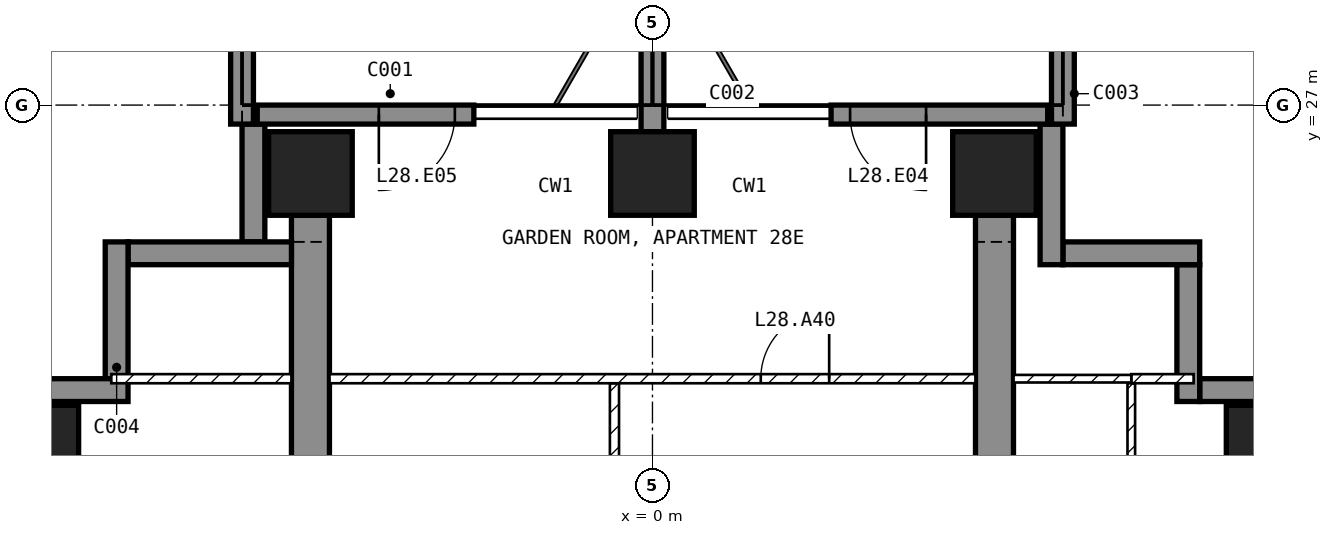
"""IFC4 building model, lengths in metres.
Left out: names, types, materials, properties, quantities, classifications, styles, units other than length and angle.
Written with IfcOpenShell. Run it as: python <this file> out.ifc"""

import sys

from ifc_helpers import new_model, si_unit, direction, frame, frame_2d, origin, origin_2d, place, context, subcontext, project, spatial, polyline, rectangle, outline, extrude, element, fill, save


model = new_model("IFC4")
c1 = context("Model", 3, precision=1e-05, world=origin(), true_north=direction((0.0, 1.0)))
c2 = subcontext(c1, "Body", "Model", "MODEL_VIEW")
j1 = project(units=[si_unit("LENGTHUNIT", "METRE"), si_unit("PLANEANGLEUNIT", "RADIAN")], contexts=[c1])
p1 = place(None, origin())
s1 = spatial("IfcSite", under=j1, at=p1, CompositionType="ELEMENT")
p2 = place(p1, origin())
s2 = spatial("IfcBuilding", under=s1, at=p2, CompositionType="ELEMENT")
p3 = place(p2, frame((0.0, 0.0, 119.9)))
s3 = spatial("IfcBuildingStorey", under=s2, at=p3, CompositionType="ELEMENT", Elevation=119.9)
for number, where, z_axis, x_axis in (
    (1, (-8.1, 22.5, -0.25), (0.0, 0.0, 1.0), (1.0, 0.0, 0.0)),
    (2, (-4.5, 26.1, -0.25), (0.0, 0.0, 1.0), (1.0, 0.0, 0.0)),
    (3, (0.0, 26.1, -0.25), (0.0, 0.0, 1.0), (1.0, 0.0, 0.0)),
    (4, (4.5, 26.1, -0.25), (0.0, 0.0, 1.0), (1.0, 0.0, 0.0)),
    (5, (8.1, 22.5, -0.25), (0.0, 0.0, 1.0), (1.0, 0.0, 0.0)),
):
    element("IfcColumn", number, at=place(p3, frame(where, z_axis=z_axis, x_axis=x_axis)), inside=s3, PredefinedType="COLUMN", context=c2, shape_type="SweptSolid", body=[
        extrude(rectangle(XDim=1.1, YDim=1.1, at=origin_2d()), origin(), (0.0, 0.0, 1.0), 3.5),
    ])
for number, where, z_axis, x_axis in (
    (6, (-4.75, 9.0, -0.25), (1.0, 0.0, 0.0), (0.0, 1.0, 0.0)),
    (7, (4.25, 9.0, -0.25), (1.0, 0.0, 0.0), (0.0, 1.0, 0.0)),
):
    element("IfcWall", number, at=place(p3, frame(where, z_axis=z_axis, x_axis=x_axis)), inside=s3, PredefinedType="SHEAR", context=c2, shape_type="SweptSolid", body=[
        extrude(outline(polyline([(0.0, 0.0), (2.1, 0.0), (2.1, 2.65), (4.5, 2.65), (4.5, 0.0), (9.9, 0.0), (9.9, 2.65), (12.3, 2.65), (12.3, 0.0), (16.55, 0.0), (16.55, 3.5), (0.0, 3.5), (0.0, 0.0)])), origin(), (0.0, 0.0, 1.0), 0.5),
    ])
p4 = place(p3, frame((5.2, 26.875, 0.0), z_axis=(0.0, 0.0, 1.0), x_axis=(-1.0, 0.0, 0.0)))
e8 = element("IfcWall", 8, at=p4, inside=s3, PredefinedType="SOLIDWALL", context=c2, shape_type="SweptSolid", body=[
    extrude(rectangle(XDim=2.85, YDim=0.25, at=frame_2d((1.425, 0.0))), origin(), (0.0, 0.0, 1.0), 3.25),
])
p5 = place(p4, frame((1.6, 0.0, 0.0)))
e9 = element("IfcOpeningElement", 9, at=p5, cuts=e8, PredefinedType="OPENING", context=c2, shape_type="SweptSolid", body=[
    extrude(rectangle(XDim=1.0, YDim=2.4, at=frame_2d((0.5, 1.2))), frame((0.0, 0.135, 0.0), z_axis=(0.0, -1.0, 0.0), x_axis=(1.0, 0.0, 0.0)), (0.0, 0.0, 1.0), 0.27),
])
p6 = place(p3, frame((-2.35, 26.875, 0.0), z_axis=(0.0, 0.0, 1.0), x_axis=(-1.0, 0.0, 0.0)))
e10 = element("IfcWall", 10, at=p6, inside=s3, PredefinedType="SOLIDWALL", context=c2, shape_type="SweptSolid", body=[
    extrude(rectangle(XDim=2.85, YDim=0.25, at=frame_2d((1.425, 0.0))), origin(), (0.0, 0.0, 1.0), 3.25),
])
p7 = place(p6, frame((0.25, 0.0, 0.0)))
e11 = element("IfcOpeningElement", 11, at=p7, cuts=e10, PredefinedType="OPENING", context=c2, shape_type="SweptSolid", body=[
    extrude(rectangle(XDim=1.0, YDim=2.4, at=frame_2d((0.5, 1.2))), frame((0.0, 0.135, 0.0), z_axis=(0.0, -1.0, 0.0), x_axis=(1.0, 0.0, 0.0)), (0.0, 0.0, 1.0), 0.27),
])
p8 = place(p3, frame((8.75, 23.25, 0.0), z_axis=(0.0, 0.0, 1.0), x_axis=(-1.0, 0.0, 0.0)))
e12 = element("IfcWall", 12, at=p8, inside=s3, PredefinedType="SOLIDWALL", context=c2, shape_type="SweptSolid", body=[
    extrude(rectangle(XDim=1.55, YDim=0.3, at=frame_2d((0.775, 0.0))), origin(), (0.0, 0.0, 1.0), 3.25),
])
p9 = place(p3, frame((7.05, 23.1, 0.0), z_axis=(0.0, 0.0, 1.0), x_axis=(0.0, 1.0, 0.0)))
e13 = element("IfcWall", 13, at=p9, inside=s3, PredefinedType="SOLIDWALL", context=c2, shape_type="SweptSolid", body=[
    extrude(rectangle(XDim=1.8, YDim=0.3, at=frame_2d((0.9, 0.0))), origin(), (0.0, 0.0, 1.0), 3.25),
])
p10 = place(p3, frame((7.2, 25.05, 0.0), z_axis=(0.0, 0.0, 1.0), x_axis=(-1.0, 0.0, 0.0)))
e14 = element("IfcWall", 14, at=p10, inside=s3, PredefinedType="SOLIDWALL", context=c2, shape_type="SweptSolid", body=[
    extrude(rectangle(XDim=1.8, YDim=0.3, at=frame_2d((0.9, 0.0))), origin(), (0.0, 0.0, 1.0), 3.25),
])
p11 = place(p3, frame((5.25, 24.9, 0.0), z_axis=(0.0, 0.0, 1.0), x_axis=(0.0, 1.0, 0.0)))
e15 = element("IfcWall", 15, at=p11, inside=s3, PredefinedType="SOLIDWALL", context=c2, shape_type="SweptSolid", body=[
    extrude(rectangle(XDim=1.85, YDim=0.3, at=frame_2d((0.925, 0.0))), origin(), (0.0, 0.0, 1.0), 3.25),
])
p12 = place(p3, frame((-5.25, 26.75, 0.0), z_axis=(0.0, 0.0, 1.0), x_axis=(0.0, -1.0, 0.0)))
e16 = element("IfcWall", 16, at=p12, inside=s3, PredefinedType="SOLIDWALL", context=c2, shape_type="SweptSolid", body=[
    extrude(rectangle(XDim=1.55, YDim=0.3, at=frame_2d((0.775, 0.0))), origin(), (0.0, 0.0, 1.0), 3.25),
])
p13 = place(p3, frame((-4.75, 25.05, 0.0), z_axis=(0.0, 0.0, 1.0), x_axis=(-1.0, 0.0, 0.0)))
e17 = element("IfcWall", 17, at=p13, inside=s3, PredefinedType="SOLIDWALL", context=c2, shape_type="SweptSolid", body=[
    extrude(rectangle(XDim=2.15, YDim=0.3, at=frame_2d((1.075, 0.0))), origin(), (0.0, 0.0, 1.0), 3.25),
])
p14 = place(p3, frame((-7.05, 25.2, 0.0), z_axis=(0.0, 0.0, 1.0), x_axis=(0.0, -1.0, 0.0)))
e18 = element("IfcWall", 18, at=p14, inside=s3, PredefinedType="SOLIDWALL", context=c2, shape_type="SweptSolid", body=[
    extrude(rectangle(XDim=1.8, YDim=0.3, at=frame_2d((0.9, 0.0))), origin(), (0.0, 0.0, 1.0), 3.25),
])
p15 = place(p3, frame((-6.9, 23.25, 0.0), z_axis=(0.0, 0.0, 1.0), x_axis=(-1.0, 0.0, 0.0)))
e19 = element("IfcWall", 19, at=p15, inside=s3, PredefinedType="SOLIDWALL", context=c2, shape_type="SweptSolid", body=[
    extrude(rectangle(XDim=1.85, YDim=0.3, at=frame_2d((0.925, 0.0))), origin(), (0.0, 0.0, 1.0), 3.25),
])
p16 = place(p3, frame((-5.4, 26.75, 0.0), z_axis=(0.0, 0.0, 1.0), x_axis=(0.0, 1.0, 0.0)))
e20 = element("IfcWall", 20, at=p16, inside=s3, PredefinedType="SOLIDWALL", context=c2, shape_type="SweptSolid", body=[
    extrude(rectangle(XDim=2.95, YDim=0.3, at=frame_2d((1.475, 0.0))), origin(), (0.0, 0.0, 1.0), 3.25),
])
p17 = place(p3, frame((0.0, 26.65, 0.0), z_axis=(0.0, 0.0, 1.0), x_axis=(0.0, 1.0, 0.0)))
e21 = element("IfcWall", 21, at=p17, inside=s3, PredefinedType="SOLIDWALL", context=c2, shape_type="SweptSolid", body=[
    extrude(rectangle(XDim=3.05, YDim=0.3, at=frame_2d((1.525, 0.0))), origin(), (0.0, 0.0, 1.0), 3.25),
])
p18 = place(p3, frame((5.4, 26.75, 0.0), z_axis=(0.0, 0.0, 1.0), x_axis=(0.0, 1.0, 0.0)))
e22 = element("IfcWall", 22, at=p18, inside=s3, PredefinedType="SOLIDWALL", context=c2, shape_type="SweptSolid", body=[
    extrude(rectangle(XDim=2.95, YDim=0.3, at=frame_2d((1.475, 0.0))), origin(), (0.0, 0.0, 1.0), 3.25),
])
p19 = place(p3, frame((-0.5, 18.96, 0.0), z_axis=(0.0, 0.0, 1.0), x_axis=(0.0, 1.0, 0.0)))
e23 = element("IfcWall", 23, at=p19, inside=s3, PredefinedType="PARTITIONING", context=c2, shape_type="SweptSolid", body=[
    extrude(rectangle(XDim=4.38, YDim=0.12, at=frame_2d((2.19, 0.0))), origin(), (0.0, 0.0, 1.0), 3.25),
])
p20 = place(p19, frame((1.74, 0.0, 0.0)))
e24 = element("IfcOpeningElement", 24, at=p20, cuts=e23, PredefinedType="OPENING", context=c2, shape_type="SweptSolid", body=[
    extrude(rectangle(XDim=0.9, YDim=2.1, at=frame_2d((0.45, 1.05))), frame((0.0, 0.07, 0.0), z_axis=(0.0, -1.0, 0.0), x_axis=(1.0, 0.0, 0.0)), (0.0, 0.0, 1.0), 0.14),
])
p21 = place(p3, frame((-4.25, 23.4, 0.0), z_axis=(0.0, 0.0, 1.0), x_axis=(1.0, 0.0, 0.0)))
e25 = element("IfcWall", 25, at=p21, inside=s3, PredefinedType="PARTITIONING", context=c2, shape_type="SweptSolid", body=[
    extrude(rectangle(XDim=8.5, YDim=0.12, at=frame_2d((4.25, 0.0))), origin(), (0.0, 0.0, 1.0), 3.25),
])
p22 = place(p21, frame((5.675, 0.0, 0.0)))
e26 = element("IfcOpeningElement", 26, at=p22, cuts=e25, PredefinedType="OPENING", context=c2, shape_type="SweptSolid", body=[
    extrude(rectangle(XDim=0.9, YDim=2.1, at=frame_2d((0.45, 1.05))), frame((0.0, 0.07, 0.0), z_axis=(0.0, -1.0, 0.0), x_axis=(1.0, 0.0, 0.0)), (0.0, 0.0, 1.0), 0.14),
])
p23 = place(p3, frame((6.3, 20.45, 0.0), z_axis=(0.0, 0.0, 1.0), x_axis=(0.0, 1.0, 0.0)))
e27 = element("IfcWall", 27, at=p23, inside=s3, PredefinedType="PARTITIONING", context=c2, shape_type="SweptSolid", body=[
    extrude(rectangle(XDim=2.89, YDim=0.1, at=frame_2d((1.445, 0.0))), origin(), (0.0, 0.0, 1.0), 3.25),
])
p24 = place(p3, frame((6.3, 23.4, 0.0), z_axis=(0.0, 0.0, 1.0), x_axis=(1.0, 0.0, 0.0)))
e28 = element("IfcWall", 28, at=p24, inside=s3, PredefinedType="PARTITIONING", context=c2, shape_type="SweptSolid", body=[
    extrude(rectangle(XDim=0.82, YDim=0.12, at=frame_2d((0.41, 0.0))), origin(), (0.0, 0.0, 1.0), 3.25),
])
p25 = place(p3, frame((4.75, 23.4, 0.0), z_axis=(0.0, 0.0, 1.0), x_axis=(1.0, 0.0, 0.0)))
e29 = element("IfcWall", 29, at=p25, inside=s3, PredefinedType="PARTITIONING", context=c2, shape_type="SweptSolid", body=[
    extrude(rectangle(XDim=1.55, YDim=0.1, at=frame_2d((0.775, 0.0))), origin(), (0.0, 0.0, 1.0), 3.25),
])
p26 = place(p3, frame((-7.12, 23.4, 0.0), z_axis=(0.0, 0.0, 1.0), x_axis=(1.0, 0.0, 0.0)))
e30 = element("IfcWall", 30, at=p26, inside=s3, PredefinedType="PARTITIONING", context=c2, shape_type="SweptSolid", body=[
    extrude(rectangle(XDim=2.37, YDim=0.12, at=frame_2d((1.185, 0.0))), origin(), (0.0, 0.0, 1.0), 3.25),
])
p27 = place(p5, origin())
e31 = element("IfcDoor", 31, at=p27, inside=s3, OperationType="SINGLE_SWING_LEFT", PredefinedType="DOOR", context=c2, shape_type="SweptSolid", body=[
    extrude(rectangle(XDim=1.0, YDim=2.4, at=frame_2d((0.5, 1.2))), frame((0.0, 0.025, 0.0), z_axis=(0.0, -1.0, 0.0), x_axis=(1.0, 0.0, 0.0)), (0.0, 0.0, 1.0), 0.05),
])
fill(e9, e31)
p28 = place(p7, origin())
e32 = element("IfcDoor", 32, at=p28, inside=s3, OperationType="SINGLE_SWING_RIGHT", PredefinedType="DOOR", context=c2, shape_type="SweptSolid", body=[
    extrude(rectangle(XDim=1.0, YDim=2.4, at=frame_2d((0.5, 1.2))), frame((0.0, 0.025, 0.0), z_axis=(0.0, -1.0, 0.0), x_axis=(1.0, 0.0, 0.0)), (0.0, 0.0, 1.0), 0.05),
])
fill(e11, e32)
p29 = place(p22, origin())
e33 = element("IfcDoor", 33, at=p29, inside=s3, OperationType="SINGLE_SWING_RIGHT", PredefinedType="DOOR", context=c2, shape_type="SweptSolid", body=[
    extrude(rectangle(XDim=0.9, YDim=2.1, at=frame_2d((0.45, 1.05))), frame((0.0, 0.025, 0.0), z_axis=(0.0, -1.0, 0.0), x_axis=(1.0, 0.0, 0.0)), (0.0, 0.0, 1.0), 0.05),
])
fill(e26, e33)
save(model, sys.argv[1])
